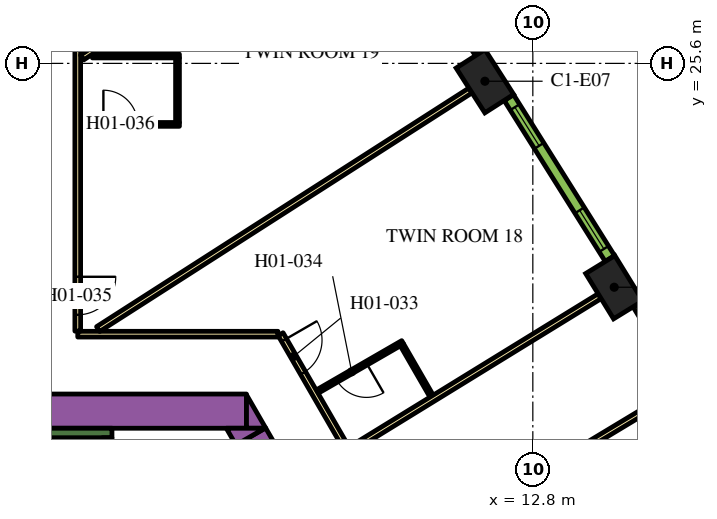
"""IFC4 building model, lengths in metres.
Left out: names, types, materials, properties, quantities, classifications, styles, units other than length and angle.
Written with IfcOpenShell. Run it as: python <this file> out.ifc"""

import sys

from ifc_helpers import new_model, si_unit, direction, frame, frame_2d, origin, origin_2d, place, context, subcontext, project, spatial, polyline, rectangle, outline, extrude, element, fill, save


model = new_model("IFC4")
c1 = context("Model", 3, precision=1e-05, world=origin(), true_north=direction((0.0, 1.0)))
c2 = subcontext(c1, "Body", "Model", "MODEL_VIEW")
j1 = project(units=[si_unit("LENGTHUNIT", "METRE"), si_unit("PLANEANGLEUNIT", "RADIAN")], contexts=[c1])
p1 = place(None, origin())
s1 = spatial("IfcSite", under=j1, at=p1, CompositionType="ELEMENT")
p2 = place(p1, origin())
s2 = spatial("IfcBuilding", under=s1, at=p2, CompositionType="ELEMENT")
p3 = place(p2, frame((0.0, 0.0, 35.4)))
s3 = spatial("IfcBuildingStorey", under=s2, at=p3, CompositionType="ELEMENT", Elevation=35.4)
for number, where, z_axis, x_axis in (
    (1, (14.942, 19.71, 0.0), (0.0, 0.0, 1.0), (-0.524, 0.852, 0.0)),
    (2, (11.539, 25.131, 0.0), (0.0, 0.0, 1.0), (-0.539, 0.842, 0.0)),
):
    element("IfcColumn", number, at=place(p3, frame(where, z_axis=z_axis, x_axis=x_axis)), inside=s3, PredefinedType="COLUMN", context=c2, shape_type="SweptSolid", body=[
        extrude(rectangle(XDim=1.4, YDim=0.9, at=origin_2d()), origin(), (0.0, 0.0, 1.0), 3.9),
    ])
p4 = place(p3, frame((-4.224, 16.45, 0.0), z_axis=(0.0, 0.0, 1.0), x_axis=(1.0, 0.0, 0.0)))
e3 = element("IfcWall", 3, at=p4, inside=s3, PredefinedType="SOLIDWALL", context=c2, shape_type="SweptSolid", body=[
    extrude(rectangle(XDim=9.488, YDim=0.9, at=frame_2d((4.744, 0.0))), origin(), (0.0, 0.0, 1.0), 3.9),
])
p5 = place(p3, origin())
e4 = element("IfcWall", 4, at=p5, inside=s3, PredefinedType="SOLIDWALL", context=c2, shape_type="SweptSolid", body=[
    extrude(outline(polyline([(5.265, 16.0), (5.265, 16.88), (5.773, 16.0), (5.265, 16.0)])), origin(), (0.0, 0.0, 1.0), 3.9),
])
p6 = place(p3, frame((5.861, 14.949, 0.0), z_axis=(0.0, 0.0, 1.0), x_axis=(-0.50011719232, 0.865957732194, 0.0)))
e5 = element("IfcWall", 5, at=p6, inside=s3, PredefinedType="SOLIDWALL", context=c2, shape_type="SweptSolid", body=[
    extrude(rectangle(XDim=0.964, YDim=0.9, at=frame_2d((0.482, 0.0))), origin(), (0.0, 0.0, 1.0), 3.9),
])
e6 = element("IfcWall", 6, at=p5, inside=s3, PredefinedType="SOLIDWALL", context=c2, shape_type="SweptSolid", body=[
    extrude(outline(polyline([(4.734, 16.0), (5.75, 16.0), (4.988, 15.56), (4.734, 16.0)])), origin(), (0.0, 0.0, 1.0), 3.9),
])
p7 = place(p3, frame((-1.725, 15.875, 0.0), z_axis=(0.0, 0.0, 1.0), x_axis=(1.0, 0.0, 0.0)))
e7 = element("IfcWall", 7, at=p7, inside=s3, PredefinedType="SOLIDWALL", context=c2, shape_type="SweptSolid", body=[
    extrude(rectangle(XDim=3.45, YDim=0.25, at=frame_2d((1.725, 0.0))), origin(), (0.0, 0.0, 1.0), 3.9),
])
p8 = place(p3, frame((1.6, 8.95, 0.0), z_axis=(0.0, 0.0, 1.0), x_axis=(0.0, 1.0, 0.0)))
e8 = element("IfcWall", 8, at=p8, inside=s3, PredefinedType="SOLIDWALL", context=c2, shape_type="SweptSolid", body=[
    extrude(rectangle(XDim=6.8, YDim=0.25, at=frame_2d((3.4, 0.0))), origin(), (0.0, 0.0, 1.0), 3.9),
])
p9 = place(p3, frame((6.163, 18.475, 0.0), z_axis=(0.0, 0.0, 1.0), x_axis=(0.500001317485, -0.866024643133, 0.0)))
e9 = element("IfcWall", 9, at=p9, inside=s3, PredefinedType="PARTITIONING", context=c2, shape_type="SweptSolid", body=[
    extrude(rectangle(XDim=25.767, YDim=0.15, at=frame_2d((12.883, 0.0))), origin(), (0.0, 0.0, 1.0), 2.75),
])
p10 = place(p9, frame((24.586, 0.0, 0.0)))
e10 = element("IfcOpeningElement", 10, at=p10, cuts=e9, PredefinedType="OPENING", context=c2, shape_type="SweptSolid", body=[
    extrude(rectangle(XDim=1.0, YDim=2.1, at=frame_2d((0.5, 1.05))), frame((0.0, 0.085, 0.0), z_axis=(0.0, -1.0, 0.0), x_axis=(1.0, 0.0, 0.0)), (0.0, 0.0, 1.0), 0.17),
])
p11 = place(p9, frame((19.319, 0.0, 0.0)))
e11 = element("IfcOpeningElement", 11, at=p11, cuts=e9, PredefinedType="OPENING", context=c2, shape_type="SweptSolid", body=[
    extrude(rectangle(XDim=1.0, YDim=2.1, at=frame_2d((0.5, 1.05))), frame((0.0, 0.085, 0.0), z_axis=(0.0, -1.0, 0.0), x_axis=(1.0, 0.0, 0.0)), (0.0, 0.0, 1.0), 0.17),
])
p12 = place(p9, frame((18.012, 0.0, 0.0)))
e12 = element("IfcOpeningElement", 12, at=p12, cuts=e9, PredefinedType="OPENING", context=c2, shape_type="SweptSolid", body=[
    extrude(rectangle(XDim=1.0, YDim=2.1, at=frame_2d((0.5, 1.05))), frame((0.0, 0.085, 0.0), z_axis=(0.0, -1.0, 0.0), x_axis=(1.0, 0.0, 0.0)), (0.0, 0.0, 1.0), 0.17),
])
p13 = place(p9, frame((6.824, 0.0, 0.0)))
e13 = element("IfcOpeningElement", 13, at=p13, cuts=e9, PredefinedType="OPENING", context=c2, shape_type="SweptSolid", body=[
    extrude(rectangle(XDim=1.1, YDim=2.1, at=frame_2d((0.55, 1.05))), frame((0.0, 0.085, 0.0), z_axis=(0.0, -1.0, 0.0), x_axis=(1.0, 0.0, 0.0)), (0.0, 0.0, 1.0), 0.17),
])
p14 = place(p9, frame((4.658, 0.0, 0.0)))
e14 = element("IfcOpeningElement", 14, at=p14, cuts=e9, PredefinedType="OPENING", context=c2, shape_type="SweptSolid", body=[
    extrude(rectangle(XDim=0.9, YDim=2.1, at=frame_2d((0.45, 1.05))), frame((0.0, 0.085, 0.0), z_axis=(0.0, -1.0, 0.0), x_axis=(1.0, 0.0, 0.0)), (0.0, 0.0, 1.0), 0.17),
])
p15 = place(p9, frame((0.18, 0.0, 0.0)))
e15 = element("IfcOpeningElement", 15, at=p15, cuts=e9, PredefinedType="OPENING", context=c2, shape_type="SweptSolid", body=[
    extrude(rectangle(XDim=1.0, YDim=2.1, at=frame_2d((0.5, 1.05))), frame((0.0, 0.085, 0.0), z_axis=(0.0, -1.0, 0.0), x_axis=(1.0, 0.0, 0.0)), (0.0, 0.0, 1.0), 0.17),
])
p16 = place(p3, frame((0.825, 18.475, 0.0), z_axis=(0.0, 0.0, 1.0), x_axis=(1.0, 0.0, 0.0)))
e16 = element("IfcWall", 16, at=p16, inside=s3, PredefinedType="PARTITIONING", context=c2, shape_type="SweptSolid", body=[
    extrude(rectangle(XDim=5.268, YDim=0.15, at=frame_2d((2.634, 0.0))), origin(), (0.0, 0.0, 1.0), 2.75),
])
p17 = place(p3, frame((0.825, 34.699, 0.0), z_axis=(0.0, 0.0, 1.0), x_axis=(0.0, -1.0, 0.0)))
e17 = element("IfcWall", 17, at=p17, inside=s3, PredefinedType="PARTITIONING", context=c2, shape_type="SweptSolid", body=[
    extrude(rectangle(XDim=16.144, YDim=0.15, at=frame_2d((8.072, 0.0))), origin(), (0.0, 0.0, 1.0), 2.75),
])
p18 = place(p17, frame((14.714, 0.0, 0.0)))
e18 = element("IfcOpeningElement", 18, at=p18, cuts=e17, PredefinedType="OPENING", context=c2, shape_type="SweptSolid", body=[
    extrude(rectangle(XDim=1.0, YDim=2.1, at=frame_2d((0.5, 1.05))), frame((0.0, 0.085, 0.0), z_axis=(0.0, -1.0, 0.0), x_axis=(1.0, 0.0, 0.0)), (0.0, 0.0, 1.0), 0.17),
])
p19 = place(p17, frame((7.275, 0.0, 0.0)))
e19 = element("IfcOpeningElement", 19, at=p19, cuts=e17, PredefinedType="OPENING", context=c2, shape_type="SweptSolid", body=[
    extrude(rectangle(XDim=1.0, YDim=2.1, at=frame_2d((0.5, 1.05))), frame((0.0, 0.085, 0.0), z_axis=(0.0, -1.0, 0.0), x_axis=(1.0, 0.0, 0.0)), (0.0, 0.0, 1.0), 0.17),
])
p20 = place(p3, frame((7.662, 30.238, 0.0), z_axis=(0.0, 0.0, 1.0), x_axis=(-0.831882886825, -0.554951225431, 0.0)))
e20 = element("IfcWall", 20, at=p20, inside=s3, PredefinedType="PARTITIONING", context=c2, shape_type="SweptSolid", body=[
    extrude(rectangle(XDim=8.079, YDim=0.15, at=frame_2d((4.04, 0.0))), origin(), (0.0, 0.0, 1.0), 2.75),
])
p21 = place(p3, frame((11.16, 24.888, 0.0), z_axis=(0.0, 0.0, 1.0), x_axis=(-0.84199813156, -0.539480441211, 0.0)))
e21 = element("IfcWall", 21, at=p21, inside=s3, PredefinedType="PARTITIONING", context=c2, shape_type="SweptSolid", body=[
    extrude(rectangle(XDim=11.638, YDim=0.15, at=frame_2d((5.819, 0.0))), origin(), (0.0, 0.0, 1.0), 2.75),
])
p22 = place(p3, frame((14.558, 19.475, 0.0), z_axis=(0.0, 0.0, 1.0), x_axis=(-0.851829455142, -0.523819223925, 0.0)))
e22 = element("IfcWall", 22, at=p22, inside=s3, PredefinedType="PARTITIONING", context=c2, shape_type="SweptSolid", body=[
    extrude(rectangle(XDim=7.688, YDim=0.15, at=frame_2d((3.844, 0.0))), origin(), (0.0, 0.0, 1.0), 2.75),
])
p23 = place(p3, frame((16.729, 17.052, 0.0), z_axis=(0.0, 0.0, 1.0), x_axis=(-0.856630606266, -0.515930232113, 0.0)))
e23 = element("IfcWall", 23, at=p23, inside=s3, PredefinedType="PARTITIONING", context=c2, shape_type="SweptSolid", body=[
    extrude(rectangle(XDim=8.355, YDim=0.15, at=frame_2d((4.178, 0.0))), origin(), (0.0, 0.0, 1.0), 2.75),
])
p24 = place(p3, frame((9.375, 18.261, 0.0), z_axis=(0.0, 0.0, 1.0), x_axis=(-0.866021400173, -0.500006934395, 0.0)))
e24 = element("IfcWall", 24, at=p24, inside=s3, PredefinedType="PARTITIONING", context=c2, shape_type="SweptSolid", body=[
    extrude(rectangle(XDim=2.6, YDim=0.1, at=frame_2d((1.3, 0.0))), origin(), (0.0, 0.0, 1.0), 2.75),
])
p25 = place(p24, frame((1.1, 0.0, 0.0)))
e25 = element("IfcOpeningElement", 25, at=p25, cuts=e24, PredefinedType="OPENING", context=c2, shape_type="SweptSolid", body=[
    extrude(rectangle(XDim=0.9, YDim=2.1, at=frame_2d((0.45, 1.05))), frame((0.0, 0.06, 0.0), z_axis=(0.0, -1.0, 0.0), x_axis=(1.0, 0.0, 0.0)), (0.0, 0.0, 1.0), 0.12),
])
p26 = place(p3, frame((9.357, 18.193, 0.0), z_axis=(0.0, 0.0, 1.0), x_axis=(0.499899694197, -0.866083307622, 0.0)))
e26 = element("IfcWall", 26, at=p26, inside=s3, PredefinedType="PARTITIONING", context=c2, shape_type="SweptSolid", body=[
    extrude(rectangle(XDim=1.55, YDim=0.1, at=frame_2d((0.775, 0.0))), origin(), (0.0, 0.0, 1.0), 2.75),
])
p27 = place(p3, frame((0.9, 23.994, 0.0), z_axis=(0.0, 0.0, 1.0), x_axis=(1.0, 0.0, 0.0)))
e27 = element("IfcWall", 27, at=p27, inside=s3, PredefinedType="PARTITIONING", context=c2, shape_type="SweptSolid", body=[
    extrude(rectangle(XDim=2.6, YDim=0.1, at=frame_2d((1.3, 0.0))), origin(), (0.0, 0.0, 1.0), 2.75),
])
p28 = place(p27, frame((0.6, 0.0, 0.0)))
e28 = element("IfcOpeningElement", 28, at=p28, cuts=e27, PredefinedType="OPENING", context=c2, shape_type="SweptSolid", body=[
    extrude(rectangle(XDim=0.9, YDim=2.1, at=frame_2d((0.45, 1.05))), frame((0.0, 0.06, 0.0), z_axis=(0.0, -1.0, 0.0), x_axis=(1.0, 0.0, 0.0)), (0.0, 0.0, 1.0), 0.12),
])
p29 = place(p3, frame((3.45, 24.044, 0.0), z_axis=(0.0, 0.0, 1.0), x_axis=(0.0, 1.0, 0.0)))
e29 = element("IfcWall", 29, at=p29, inside=s3, PredefinedType="PARTITIONING", context=c2, shape_type="SweptSolid", body=[
    extrude(rectangle(XDim=1.7, YDim=0.1, at=frame_2d((0.85, 0.0))), origin(), (0.0, 0.0, 1.0), 2.75),
])
p30 = place(p3, frame((1.21, 25.794, 0.0), z_axis=(0.0, 0.0, 1.0), x_axis=(1.0, 0.0, 0.0)))
e30 = element("IfcWall", 30, at=p30, inside=s3, PredefinedType="PARTITIONING", context=c2, shape_type="SweptSolid", body=[
    extrude(rectangle(XDim=2.29, YDim=0.1, at=frame_2d((1.145, 0.0))), origin(), (0.0, 0.0, 1.0), 2.75),
])
p31 = place(p3, frame((18.143, 14.986, 0.0), z_axis=(0.0, 0.0, 1.0), x_axis=(-0.515938796285, 0.856625448191, 0.0)))
e31 = element("IfcWall", 31, at=p31, inside=s3, PredefinedType="SOLIDWALL", context=c2, shape_type="SweptSolid", body=[
    extrude(rectangle(XDim=4.998, YDim=0.29, at=frame_2d((2.499, 0.0))), origin(), (0.0, 0.0, 1.0), 3.65),
])
p32 = place(p31, frame((0.297, 0.0, 0.9)))
e32 = element("IfcOpeningElement", 32, at=p32, cuts=e31, PredefinedType="OPENING", context=c2, shape_type="SweptSolid", body=[
    extrude(rectangle(XDim=1.2, YDim=2.15, at=frame_2d((0.6, 1.075))), frame((0.0, 0.155, 0.0), z_axis=(0.0, -1.0, 0.0), x_axis=(1.0, 0.0, 0.0)), (0.0, 0.0, 1.0), 0.31),
])
p33 = place(p31, frame((3.501, 0.0, 0.9)))
e33 = element("IfcOpeningElement", 33, at=p33, cuts=e31, PredefinedType="OPENING", context=c2, shape_type="SweptSolid", body=[
    extrude(rectangle(XDim=1.2, YDim=2.15, at=frame_2d((0.6, 1.075))), frame((0.0, 0.155, 0.0), z_axis=(0.0, -1.0, 0.0), x_axis=(1.0, 0.0, 0.0)), (0.0, 0.0, 1.0), 0.31),
])
p34 = place(p3, frame((14.827, 20.466, 0.0), z_axis=(0.0, 0.0, 1.0), x_axis=(-0.531688286542, 0.846940119462, 0.0)))
e34 = element("IfcWall", 34, at=p34, inside=s3, PredefinedType="SOLIDWALL", context=c2, shape_type="SweptSolid", body=[
    extrude(rectangle(XDim=4.998, YDim=0.29, at=frame_2d((2.499, 0.0))), origin(), (0.0, 0.0, 1.0), 3.65),
])
p35 = place(p34, frame((0.297, 0.0, 0.9)))
e35 = element("IfcOpeningElement", 35, at=p35, cuts=e34, PredefinedType="OPENING", context=c2, shape_type="SweptSolid", body=[
    extrude(rectangle(XDim=1.2, YDim=2.15, at=frame_2d((0.6, 1.075))), frame((0.0, 0.155, 0.0), z_axis=(0.0, -1.0, 0.0), x_axis=(1.0, 0.0, 0.0)), (0.0, 0.0, 1.0), 0.31),
])
p36 = place(p34, frame((3.501, 0.0, 0.9)))
e36 = element("IfcOpeningElement", 36, at=p36, cuts=e34, PredefinedType="OPENING", context=c2, shape_type="SweptSolid", body=[
    extrude(rectangle(XDim=1.2, YDim=2.15, at=frame_2d((0.6, 1.075))), frame((0.0, 0.155, 0.0), z_axis=(0.0, -1.0, 0.0), x_axis=(1.0, 0.0, 0.0)), (0.0, 0.0, 1.0), 0.31),
])
p37 = place(p3, frame((11.411, 25.884, 0.0), z_axis=(0.0, 0.0, 1.0), x_axis=(-0.547204617628, 0.836998868845, 0.0)))
e37 = element("IfcWall", 37, at=p37, inside=s3, PredefinedType="SOLIDWALL", context=c2, shape_type="SweptSolid", body=[
    extrude(rectangle(XDim=4.998, YDim=0.29, at=frame_2d((2.499, 0.0))), origin(), (0.0, 0.0, 1.0), 3.65),
])
p38 = place(p37, frame((0.297, 0.0, 0.9)))
e38 = element("IfcOpeningElement", 38, at=p38, cuts=e37, PredefinedType="OPENING", context=c2, shape_type="SweptSolid", body=[
    extrude(rectangle(XDim=1.2, YDim=2.15, at=frame_2d((0.6, 1.075))), frame((0.0, 0.155, 0.0), z_axis=(0.0, -1.0, 0.0), x_axis=(1.0, 0.0, 0.0)), (0.0, 0.0, 1.0), 0.31),
])
p39 = place(p37, frame((3.501, 0.0, 0.9)))
e39 = element("IfcOpeningElement", 39, at=p39, cuts=e37, PredefinedType="OPENING", context=c2, shape_type="SweptSolid", body=[
    extrude(rectangle(XDim=1.2, YDim=2.15, at=frame_2d((0.6, 1.075))), frame((0.0, 0.155, 0.0), z_axis=(0.0, -1.0, 0.0), x_axis=(1.0, 0.0, 0.0)), (0.0, 0.0, 1.0), 0.31),
])
p40 = place(p15, origin())
e40 = element("IfcDoor", 40, at=p40, inside=s3, OperationType="SINGLE_SWING_LEFT", PredefinedType="DOOR", context=c2, shape_type="SweptSolid", body=[
    extrude(rectangle(XDim=1.0, YDim=2.1, at=frame_2d((0.5, 1.05))), frame((0.0, 0.025, 0.0), z_axis=(0.0, -1.0, 0.0), x_axis=(1.0, 0.0, 0.0)), (0.0, 0.0, 1.0), 0.05),
])
fill(e15, e40)
p41 = place(p25, origin())
e41 = element("IfcDoor", 41, at=p41, inside=s3, OperationType="SINGLE_SWING_RIGHT", PredefinedType="DOOR", context=c2, shape_type="SweptSolid", body=[
    extrude(rectangle(XDim=0.9, YDim=2.1, at=frame_2d((0.45, 1.05))), frame((0.0, 0.025, 0.0), z_axis=(0.0, -1.0, 0.0), x_axis=(1.0, 0.0, 0.0)), (0.0, 0.0, 1.0), 0.05),
])
fill(e25, e41)
p42 = place(p18, origin())
e42 = element("IfcDoor", 42, at=p42, inside=s3, OperationType="SINGLE_SWING_RIGHT", PredefinedType="DOOR", context=c2, shape_type="SweptSolid", body=[
    extrude(rectangle(XDim=1.0, YDim=2.1, at=frame_2d((0.5, 1.05))), frame((0.0, 0.025, 0.0), z_axis=(0.0, -1.0, 0.0), x_axis=(1.0, 0.0, 0.0)), (0.0, 0.0, 1.0), 0.05),
])
fill(e18, e42)
p43 = place(p28, origin())
e43 = element("IfcDoor", 43, at=p43, inside=s3, OperationType="SINGLE_SWING_LEFT", PredefinedType="DOOR", context=c2, shape_type="SweptSolid", body=[
    extrude(rectangle(XDim=0.9, YDim=2.1, at=frame_2d((0.45, 1.05))), frame((0.0, 0.025, 0.0), z_axis=(0.0, -1.0, 0.0), x_axis=(1.0, 0.0, 0.0)), (0.0, 0.0, 1.0), 0.05),
])
fill(e28, e43)
p44 = place(p35, origin())
e44 = element("IfcWindow", 44, at=p44, inside=s3, PartitioningType="DOUBLE_PANEL_VERTICAL", PredefinedType="WINDOW", context=c2, shape_type="SweptSolid", body=[
    extrude(rectangle(XDim=1.2, YDim=2.15, at=frame_2d((0.6, 1.075))), frame((0.0, 0.015, 0.0), z_axis=(0.0, -1.0, 0.0), x_axis=(1.0, 0.0, 0.0)), (0.0, 0.0, 1.0), 0.06),
])
fill(e35, e44)
p45 = place(p36, origin())
e45 = element("IfcWindow", 45, at=p45, inside=s3, PartitioningType="DOUBLE_PANEL_VERTICAL", PredefinedType="WINDOW", context=c2, shape_type="SweptSolid", body=[
    extrude(rectangle(XDim=1.2, YDim=2.15, at=frame_2d((0.6, 1.075))), frame((0.0, 0.015, 0.0), z_axis=(0.0, -1.0, 0.0), x_axis=(1.0, 0.0, 0.0)), (0.0, 0.0, 1.0), 0.06),
])
fill(e36, e45)
save(model, sys.argv[1])
